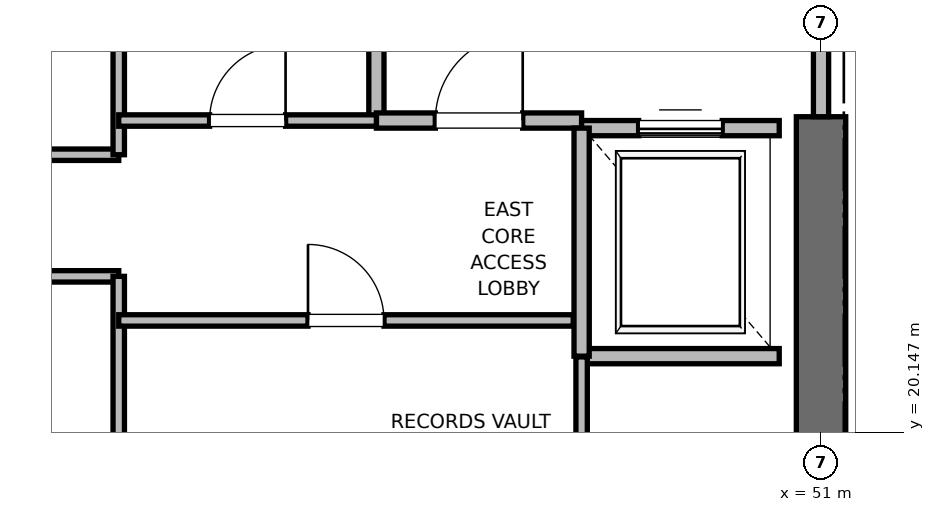
"""IFC4 building model, lengths in metres.
Left out: names, types, materials, properties, quantities, classifications, styles, units other than length and angle.
Written with IfcOpenShell. Run it as: python <this file> out.ifc"""

import sys

from ifc_helpers import new_model, si_unit, direction, frame, frame_2d, origin, place, context, subcontext, project, spatial, rectangle, extrude, element, fill, save


model = new_model("IFC4")
c1 = context("Model", 3, precision=1e-05, world=origin(), true_north=direction((0.0, 1.0)))
c2 = subcontext(c1, "Body", "Model", "MODEL_VIEW")
j1 = project(units=[si_unit("LENGTHUNIT", "METRE"), si_unit("PLANEANGLEUNIT", "RADIAN")], contexts=[c1])
p1 = place(None, origin())
s1 = spatial("IfcSite", under=j1, at=p1, CompositionType="ELEMENT")
p2 = place(p1, origin())
s2 = spatial("IfcBuilding", under=s1, at=p2, CompositionType="ELEMENT")
p3 = place(p2, frame((0.0, 0.0, 31.6)))
s3 = spatial("IfcBuildingStorey", under=s2, at=p3, CompositionType="ELEMENT", Elevation=31.6)
p4 = place(p3, frame((51.0, 18.5, 0.0), z_axis=(0.0, 0.0, 1.0), x_axis=(0.0, 1.0, 0.0)))
e1 = element("IfcWall", 1, at=p4, inside=s3, PredefinedType="SHEAR", context=c2, shape_type="SweptSolid", body=[
    extrude(rectangle(XDim=5.8, YDim=0.65, at=frame_2d((2.9, 0.0))), origin(), (0.0, 0.0, 1.0), 3.76),
])
p5 = place(p3, frame((45.15, 24.25, 0.0), z_axis=(0.0, 0.0, 1.0), x_axis=(0.0, 1.0, 0.0)))
e2 = element("IfcWall", 2, at=p5, inside=s3, PredefinedType="PARTITIONING", context=c2, shape_type="SweptSolid", body=[
    extrude(rectangle(XDim=3.37, YDim=0.2, at=frame_2d((1.685, 0.0))), origin(), (0.0, 0.0, 1.0), 3.76),
])
p6 = place(p3, frame((45.15, 24.25, 0.0), z_axis=(0.0, 0.0, 1.0), x_axis=(1.0, 0.0, 0.0)))
e3 = element("IfcWall", 3, at=p6, inside=s3, PredefinedType="PARTITIONING", context=c2, shape_type="SweptSolid", body=[
    extrude(rectangle(XDim=2.7, YDim=0.2, at=frame_2d((1.35, 0.0))), origin(), (0.0, 0.0, 1.0), 3.76),
])
p7 = place(p6, frame((0.775, 0.0, 0.0)))
e4 = element("IfcOpeningElement", 4, at=p7, cuts=e3, PredefinedType="OPENING", context=c2, shape_type="SweptSolid", body=[
    extrude(rectangle(XDim=1.15, YDim=2.2, at=frame_2d((0.575, 1.1))), frame((0.0, 0.1, 0.0), z_axis=(0.0, -1.0, 0.0), x_axis=(1.0, 0.0, 0.0)), (0.0, 0.0, 1.0), 0.2),
])
p8 = place(p3, frame((51.0, 24.3, 0.0), z_axis=(0.0, 0.0, 1.0), x_axis=(0.0, 1.0, 0.0)))
e5 = element("IfcWall", 5, at=p8, inside=s3, PredefinedType="PARTITIONING", context=c2, shape_type="SweptSolid", body=[
    extrude(rectangle(XDim=3.4, YDim=0.2, at=frame_2d((1.7, 0.0))), origin(), (0.0, 0.0, 1.0), 2.54),
])
p9 = place(p8, frame((1.125, 0.0, 0.0)))
e6 = element("IfcOpeningElement", 6, at=p9, cuts=e5, PredefinedType="OPENING", context=c2, shape_type="SweptSolid", body=[
    extrude(rectangle(XDim=1.15, YDim=2.2, at=frame_2d((0.575, 1.1))), frame((0.0, 0.1, 0.0), z_axis=(0.0, -1.0, 0.0), x_axis=(1.0, 0.0, 0.0)), (0.0, 0.0, 1.0), 0.2),
])
p10 = place(p3, frame((47.85, 21.15, 0.0), z_axis=(0.0, 0.0, 1.0), x_axis=(1.0, 0.0, 0.0)))
e7 = element("IfcWall", 7, at=p10, inside=s3, PredefinedType="SOLIDWALL", context=c2, shape_type="SweptSolid", body=[
    extrude(rectangle(XDim=2.6, YDim=0.2, at=frame_2d((1.3, 0.0))), origin(), (0.0, 0.0, 1.0), 3.76),
])
p11 = place(p3, frame((50.45, 24.15, 0.0), z_axis=(0.0, 0.0, 1.0), x_axis=(-1.0, 0.0, 0.0)))
e8 = element("IfcWall", 8, at=p11, inside=s3, PredefinedType="SOLIDWALL", context=c2, shape_type="SweptSolid", body=[
    extrude(rectangle(XDim=2.6, YDim=0.2, at=frame_2d((1.3, 0.0))), origin(), (0.0, 0.0, 1.0), 2.54),
])
p12 = place(p11, frame((0.75, 0.0, 0.0)))
e9 = element("IfcOpeningElement", 9, at=p12, cuts=e8, PredefinedType="OPENING", context=c2, shape_type="SweptSolid", body=[
    extrude(rectangle(XDim=1.1, YDim=2.2, at=frame_2d((0.55, 1.1))), frame((0.0, 0.1, 0.0), z_axis=(0.0, -1.0, 0.0), x_axis=(1.0, 0.0, 0.0)), (0.0, 0.0, 1.0), 0.2),
])
p13 = place(p3, frame((47.85, 24.15, 0.0), z_axis=(0.0, 0.0, 1.0), x_axis=(0.0, -1.0, 0.0)))
e10 = element("IfcWall", 10, at=p13, inside=s3, PredefinedType="SOLIDWALL", context=c2, shape_type="SweptSolid", body=[
    extrude(rectangle(XDim=3.0, YDim=0.2, at=frame_2d((1.5, 0.0))), origin(), (0.0, 0.0, 1.0), 3.76),
])
for number, where, z_axis, x_axis in (
    (11, (39.95, 22.2, 0.0), (0.0, 0.0, 1.0), (1.0, 0.0, 0.0)),
    (12, (39.95, 23.8, 0.0), (0.0, 0.0, 1.0), (1.0, 0.0, 0.0)),
):
    element("IfcWall", number, at=place(p3, frame(where, z_axis=z_axis, x_axis=x_axis)), inside=s3, PredefinedType="PARTITIONING", context=c2, shape_type="SweptSolid", body=[
        extrude(rectangle(XDim=1.81, YDim=0.15, at=frame_2d((0.905, 0.0))), origin(), (0.0, 0.0, 1.0), 2.85),
    ])
p14 = place(p3, frame((41.76, 18.6, 0.0), z_axis=(0.0, 0.0, 1.0), x_axis=(0.0, 1.0, 0.0)))
e13 = element("IfcWall", 13, at=p14, inside=s3, PredefinedType="PARTITIONING", context=c2, shape_type="SweptSolid", body=[
    extrude(rectangle(XDim=3.6, YDim=0.15, at=frame_2d((1.8, 0.0))), origin(), (0.0, 0.0, 1.0), 2.54),
])
p15 = place(p3, frame((41.76, 23.8, 0.0), z_axis=(0.0, 0.0, 1.0), x_axis=(0.0, 1.0, 0.0)))
e14 = element("IfcWall", 14, at=p15, inside=s3, PredefinedType="PARTITIONING", context=c2, shape_type="SweptSolid", body=[
    extrude(rectangle(XDim=4.0, YDim=0.15, at=frame_2d((2.0, 0.0))), origin(), (0.0, 0.0, 1.0), 2.85),
])
p16 = place(p3, frame((47.85, 18.6, 0.0), z_axis=(0.0, 0.0, 1.0), x_axis=(0.0, 1.0, 0.0)))
e15 = element("IfcWall", 15, at=p16, inside=s3, PredefinedType="PARTITIONING", context=c2, shape_type="SweptSolid", body=[
    extrude(rectangle(XDim=2.54, YDim=0.15, at=frame_2d((1.27, 0.0))), origin(), (0.0, 0.0, 1.0), 2.85),
])
p17 = place(p3, frame((41.76, 21.62, 0.0), z_axis=(0.0, 0.0, 1.0), x_axis=(1.0, 0.0, 0.0)))
e16 = element("IfcWall", 16, at=p17, inside=s3, PredefinedType="PARTITIONING", context=c2, shape_type="SweptSolid", body=[
    extrude(rectangle(XDim=5.98, YDim=0.15, at=frame_2d((2.99, 0.0))), origin(), (0.0, 0.0, 1.0), 2.85),
])
p18 = place(p17, frame((2.49, 0.0, 0.0)))
e17 = element("IfcOpeningElement", 17, at=p18, cuts=e16, PredefinedType="OPENING", context=c2, shape_type="SweptSolid", body=[
    extrude(rectangle(XDim=1.0, YDim=2.15, at=frame_2d((0.5, 1.075))), frame((0.0, 0.075, 0.0), z_axis=(0.0, -1.0, 0.0), x_axis=(1.0, 0.0, 0.0)), (0.0, 0.0, 1.0), 0.15),
])
p19 = place(p3, frame((41.76, 24.25, 0.0), z_axis=(0.0, 0.0, 1.0), x_axis=(1.0, 0.0, 0.0)))
e18 = element("IfcWall", 18, at=p19, inside=s3, PredefinedType="PARTITIONING", context=c2, shape_type="SweptSolid", body=[
    extrude(rectangle(XDim=3.39, YDim=0.15, at=frame_2d((1.695, 0.0))), origin(), (0.0, 0.0, 1.0), 2.85),
])
p20 = place(p19, frame((1.195, 0.0, 0.0)))
e19 = element("IfcOpeningElement", 19, at=p20, cuts=e18, PredefinedType="OPENING", context=c2, shape_type="SweptSolid", body=[
    extrude(rectangle(XDim=1.0, YDim=2.15, at=frame_2d((0.5, 1.075))), frame((0.0, 0.075, 0.0), z_axis=(0.0, -1.0, 0.0), x_axis=(1.0, 0.0, 0.0)), (0.0, 0.0, 1.0), 0.15),
])
p21 = place(p7, origin())
e20 = element("IfcDoor", 20, at=p21, inside=s3, OperationType="SINGLE_SWING_RIGHT", PredefinedType="DOOR", context=c2, shape_type="SweptSolid", body=[
    extrude(rectangle(XDim=1.15, YDim=2.2, at=frame_2d((0.575, 1.1))), frame((0.0, 0.025, 0.0), z_axis=(0.0, -1.0, 0.0), x_axis=(1.0, 0.0, 0.0)), (0.0, 0.0, 1.0), 0.05),
])
fill(e4, e20)
p22 = place(p12, origin())
e21 = element("IfcDoor", 21, at=p22, inside=s3, OperationType="SLIDING_TO_RIGHT", PredefinedType="DOOR", context=c2, shape_type="SweptSolid", body=[
    extrude(rectangle(XDim=1.1, YDim=2.2, at=frame_2d((0.55, 1.1))), frame((0.0, 0.025, 0.0), z_axis=(0.0, -1.0, 0.0), x_axis=(1.0, 0.0, 0.0)), (0.0, 0.0, 1.0), 0.05),
])
fill(e9, e21)
p23 = place(p18, origin())
e22 = element("IfcDoor", 22, at=p23, inside=s3, OperationType="SINGLE_SWING_LEFT", PredefinedType="DOOR", context=c2, shape_type="SweptSolid", body=[
    extrude(rectangle(XDim=1.0, YDim=2.15, at=frame_2d((0.5, 1.075))), frame((0.0, 0.025, 0.0), z_axis=(0.0, -1.0, 0.0), x_axis=(1.0, 0.0, 0.0)), (0.0, 0.0, 1.0), 0.05),
])
fill(e17, e22)
p24 = place(p20, origin())
e23 = element("IfcDoor", 23, at=p24, inside=s3, OperationType="SINGLE_SWING_RIGHT", PredefinedType="DOOR", context=c2, shape_type="SweptSolid", body=[
    extrude(rectangle(XDim=1.0, YDim=2.15, at=frame_2d((0.5, 1.075))), frame((0.0, 0.025, 0.0), z_axis=(0.0, -1.0, 0.0), x_axis=(1.0, 0.0, 0.0)), (0.0, 0.0, 1.0), 0.05),
])
fill(e19, e23)
save(model, sys.argv[1])
